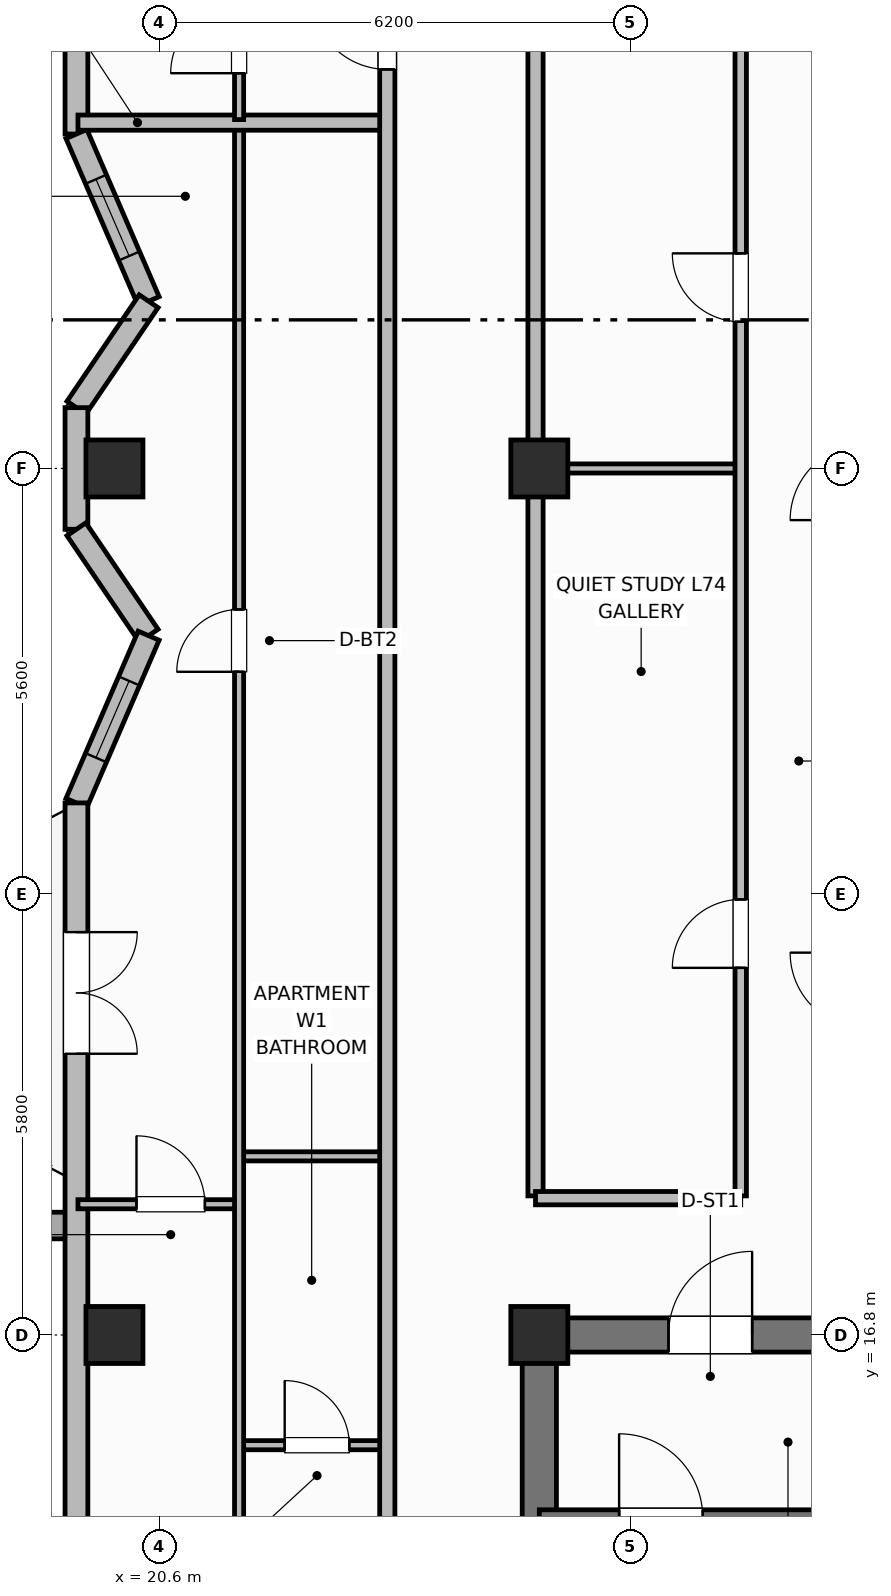
"""IFC4 building model, lengths in metres.
Left out: names, types, materials, properties, quantities, classifications, styles, units other than length and angle.
Written with IfcOpenShell. Run it as: python <this file> out.ifc"""

import sys

from ifc_helpers import new_model, si_unit, direction, frame, frame_2d, origin, origin_2d, place, context, subcontext, project, spatial, rectangle, extrude, element, fill, save


model = new_model("IFC4")
c1 = context("Model", 3, precision=1e-05, world=origin(), true_north=direction((0.0, 1.0)))
c2 = subcontext(c1, "Body", "Model", "MODEL_VIEW")
j1 = project(units=[si_unit("LENGTHUNIT", "METRE"), si_unit("PLANEANGLEUNIT", "RADIAN")], contexts=[c1])
p1 = place(None, origin())
s1 = spatial("IfcSite", under=j1, at=p1, CompositionType="ELEMENT")
p2 = place(p1, origin())
s2 = spatial("IfcBuilding", under=s1, at=p2, CompositionType="ELEMENT")
p3 = place(p2, frame((0.0, 0.0, 293.5)))
s3 = spatial("IfcBuildingStorey", under=s2, at=p3, CompositionType="ELEMENT", Elevation=293.5)
p4 = place(p3, frame((25.6, 10.825, 0.0), z_axis=(0.0, 0.0, 1.0), x_axis=(0.0, 1.0, 0.0)))
e1 = element("IfcWall", 1, at=p4, inside=s3, PredefinedType="SHEAR", context=c2, shape_type="SweptSolid", body=[
    extrude(rectangle(XDim=5.75, YDim=0.45, at=frame_2d((2.875, 0.0))), origin(), (0.0, 0.0, 1.0), 3.7),
])
p5 = place(p3, frame((25.6, 16.8, 0.0), z_axis=(0.0, 0.0, 1.0), x_axis=(1.0, 0.0, 0.0)))
e2 = element("IfcWall", 2, at=p5, inside=s3, PredefinedType="SHEAR", context=c2, shape_type="SweptSolid", body=[
    extrude(rectangle(XDim=27.2, YDim=0.45, at=frame_2d((13.6, 0.0))), origin(), (0.0, 0.0, 1.0), 3.7),
])
p6 = place(p5, frame((1.7, 0.0, 0.0)))
e3 = element("IfcOpeningElement", 3, at=p6, cuts=e2, PredefinedType="OPENING", context=c2, shape_type="SweptSolid", body=[
    extrude(rectangle(XDim=1.1, YDim=2.15, at=frame_2d((0.55, 1.075))), frame((0.0, 0.235, 0.0), z_axis=(0.0, -1.0, 0.0), x_axis=(1.0, 0.0, 0.0)), (0.0, 0.0, 1.0), 0.47),
])
p7 = place(p5, frame((4.45, 0.0, 0.0)))
e4 = element("IfcOpeningElement", 4, at=p7, cuts=e2, PredefinedType="OPENING", context=c2, shape_type="SweptSolid", body=[
    extrude(rectangle(XDim=0.85, YDim=2.1, at=frame_2d((0.425, 1.05))), frame((0.0, 0.235, 0.0), z_axis=(0.0, -1.0, 0.0), x_axis=(1.0, 0.0, 0.0)), (0.0, 0.0, 1.0), 0.47),
])
p8 = place(p5, frame((6.5, 0.0, 0.0)))
e5 = element("IfcOpeningElement", 5, at=p8, cuts=e2, PredefinedType="OPENING", context=c2, shape_type="SweptSolid", body=[
    extrude(rectangle(XDim=0.85, YDim=2.1, at=frame_2d((0.425, 1.05))), frame((0.0, 0.235, 0.0), z_axis=(0.0, -1.0, 0.0), x_axis=(1.0, 0.0, 0.0)), (0.0, 0.0, 1.0), 0.47),
])
p9 = place(p5, frame((13.0, 0.0, 0.0)))
e6 = element("IfcOpeningElement", 6, at=p9, cuts=e2, PredefinedType="OPENING", context=c2, shape_type="SweptSolid", body=[
    extrude(rectangle(XDim=1.2, YDim=2.15, at=frame_2d((0.6, 1.075))), frame((0.0, 0.235, 0.0), z_axis=(0.0, -1.0, 0.0), x_axis=(1.0, 0.0, 0.0)), (0.0, 0.0, 1.0), 0.47),
])
p10 = place(p5, frame((19.8, 0.0, 0.0)))
e7 = element("IfcOpeningElement", 7, at=p10, cuts=e2, PredefinedType="OPENING", context=c2, shape_type="SweptSolid", body=[
    extrude(rectangle(XDim=0.85, YDim=2.1, at=frame_2d((0.425, 1.05))), frame((0.0, 0.235, 0.0), z_axis=(0.0, -1.0, 0.0), x_axis=(1.0, 0.0, 0.0)), (0.0, 0.0, 1.0), 0.47),
])
p11 = place(p5, frame((24.2, 0.0, 0.0)))
e8 = element("IfcOpeningElement", 8, at=p11, cuts=e2, PredefinedType="OPENING", context=c2, shape_type="SweptSolid", body=[
    extrude(rectangle(XDim=0.85, YDim=2.1, at=frame_2d((0.425, 1.05))), frame((0.0, 0.235, 0.0), z_axis=(0.0, -1.0, 0.0), x_axis=(1.0, 0.0, 0.0)), (0.0, 0.0, 1.0), 0.47),
])
for number, where, z_axis, x_axis in (
    (9, (25.6, 16.8, 0.0), (0.0, 0.0, 1.0), (1.0, 0.0, 0.0)),
    (10, (25.6, 28.2, 0.0), (0.0, 0.0, 1.0), (1.0, 0.0, 0.0)),
    (11, (20.01, 16.8, 0.0), (0.0, 0.0, 1.0), (1.0, 0.0, 0.0)),
    (12, (20.01, 28.2, 0.0), (0.0, 0.0, 1.0), (1.0, 0.0, 0.0)),
):
    element("IfcColumn", number, at=place(p3, frame(where, z_axis=z_axis, x_axis=x_axis)), inside=s3, PredefinedType="COLUMN", context=c2, shape_type="SweptSolid", body=[
        extrude(rectangle(XDim=0.75, YDim=0.75, at=origin_2d()), origin(), (0.0, 0.0, 1.0), 3.7),
    ])
p12 = place(p3, frame((19.51, 35.27, 0.0), z_axis=(0.0, 0.0, 1.0), x_axis=(0.0, -1.0, 0.0)))
e13 = element("IfcWall", 13, at=p12, inside=s3, PredefinedType="SOLIDWALL", context=c2, shape_type="SweptSolid", body=[
    extrude(rectangle(XDim=2.67, YDim=0.3, at=frame_2d((1.335, 0.0))), origin(), (0.0, 0.0, 1.0), 2.71),
])
p13 = place(p3, frame((19.51, 32.6, 0.0), z_axis=(0.0, 0.0, 1.0), x_axis=(0.396389181543, -0.918082576218, 0.0)))
e14 = element("IfcWall", 14, at=p13, inside=s3, PredefinedType="SOLIDWALL", context=c2, shape_type="SweptSolid", body=[
    extrude(rectangle(XDim=2.396, YDim=0.3, at=frame_2d((1.198, 0.0))), origin(), (0.0, 0.0, 1.0), 2.71),
])
p14 = place(p13, frame((0.648, 0.0, 0.9)))
e15 = element("IfcOpeningElement", 15, at=p14, cuts=e14, PredefinedType="OPENING", context=c2, shape_type="SweptSolid", body=[
    extrude(rectangle(XDim=1.1, YDim=1.65, at=frame_2d((0.55, 0.825))), frame((0.0, 0.16, 0.0), z_axis=(0.0, -1.0, 0.0), x_axis=(1.0, 0.0, 0.0)), (0.0, 0.0, 1.0), 0.32),
])
p15 = place(p3, frame((20.46, 30.4, 0.0), z_axis=(0.0, 0.0, 1.0), x_axis=(-0.561508476251, -0.827470985049, 0.0)))
e16 = element("IfcWall", 16, at=p15, inside=s3, PredefinedType="SOLIDWALL", context=c2, shape_type="SweptSolid", body=[
    extrude(rectangle(XDim=1.692, YDim=0.3, at=frame_2d((0.846, 0.0))), origin(), (0.0, 0.0, 1.0), 2.71),
])
p16 = place(p3, frame((19.51, 29.0, 0.0), z_axis=(0.0, 0.0, 1.0), x_axis=(0.0, -1.0, 0.0)))
e17 = element("IfcWall", 17, at=p16, inside=s3, PredefinedType="SOLIDWALL", context=c2, shape_type="SweptSolid", body=[
    extrude(rectangle(XDim=1.6, YDim=0.3, at=frame_2d((0.8, 0.0))), origin(), (0.0, 0.0, 1.0), 2.71),
])
p17 = place(p3, frame((19.51, 27.4, 0.0), z_axis=(0.0, 0.0, 1.0), x_axis=(0.561508476251, -0.827470985049, 0.0)))
e18 = element("IfcWall", 18, at=p17, inside=s3, PredefinedType="SOLIDWALL", context=c2, shape_type="SweptSolid", body=[
    extrude(rectangle(XDim=1.692, YDim=0.3, at=frame_2d((0.846, 0.0))), origin(), (0.0, 0.0, 1.0), 2.71),
])
p18 = place(p3, frame((20.46, 26.0, 0.0), z_axis=(0.0, 0.0, 1.0), x_axis=(-0.396426258231, -0.918066567186, 0.0)))
e19 = element("IfcWall", 19, at=p18, inside=s3, PredefinedType="SOLIDWALL", context=c2, shape_type="SweptSolid", body=[
    extrude(rectangle(XDim=2.396, YDim=0.3, at=frame_2d((1.198, 0.0))), origin(), (0.0, 0.0, 1.0), 2.71),
])
p19 = place(p18, frame((0.648, 0.0, 0.9)))
e20 = element("IfcOpeningElement", 20, at=p19, cuts=e19, PredefinedType="OPENING", context=c2, shape_type="SweptSolid", body=[
    extrude(rectangle(XDim=1.1, YDim=1.65, at=frame_2d((0.55, 0.825))), frame((0.0, 0.16, 0.0), z_axis=(0.0, -1.0, 0.0), x_axis=(1.0, 0.0, 0.0)), (0.0, 0.0, 1.0), 0.32),
])
p20 = place(p3, frame((19.51, 23.8, 0.0), z_axis=(0.0, 0.0, 1.0), x_axis=(0.0, -1.0, 0.0)))
e21 = element("IfcWall", 21, at=p20, inside=s3, PredefinedType="SOLIDWALL", context=c2, shape_type="SweptSolid", body=[
    extrude(rectangle(XDim=11.12, YDim=0.3, at=frame_2d((5.56, 0.0))), origin(), (0.0, 0.0, 1.0), 2.71),
])
p21 = place(p20, frame((1.7, 0.0, 0.0)))
e22 = element("IfcOpeningElement", 22, at=p21, cuts=e21, PredefinedType="OPENING", context=c2, shape_type="SweptSolid", body=[
    extrude(rectangle(XDim=1.6, YDim=2.1, at=frame_2d((0.8, 1.05))), frame((0.0, 0.16, 0.0), z_axis=(0.0, -1.0, 0.0), x_axis=(1.0, 0.0, 0.0)), (0.0, 0.0, 1.0), 0.32),
])
p22 = place(p3, frame((25.6, 14.4, 0.0), z_axis=(0.0, 0.0, 1.0), x_axis=(1.0, 0.0, 0.0)))
e23 = element("IfcWall", 23, at=p22, inside=s3, PredefinedType="SHEAR", context=c2, shape_type="SweptSolid", body=[
    extrude(rectangle(XDim=9.55, YDim=0.2, at=frame_2d((4.775, 0.0))), origin(), (0.0, 0.0, 1.0), 3.7),
])
p23 = place(p22, frame((1.05, 0.0, 0.0)))
e24 = element("IfcOpeningElement", 24, at=p23, cuts=e23, PredefinedType="OPENING", context=c2, shape_type="SweptSolid", body=[
    extrude(rectangle(XDim=1.1, YDim=2.15, at=frame_2d((0.55, 1.075))), frame((0.0, 0.11, 0.0), z_axis=(0.0, -1.0, 0.0), x_axis=(1.0, 0.0, 0.0)), (0.0, 0.0, 1.0), 0.22),
])
p24 = place(p3, frame((25.55, 18.63, 0.0), z_axis=(0.0, 0.0, 1.0), x_axis=(0.0, 1.0, 0.0)))
e25 = element("IfcWall", 25, at=p24, inside=s3, PredefinedType="PARTITIONING", context=c2, shape_type="SweptSolid", body=[
    extrude(rectangle(XDim=19.14, YDim=0.2, at=frame_2d((9.57, 0.0))), origin(), (0.0, 0.0, 1.0), 2.54),
])
p25 = place(p3, frame((25.55, 18.6, 0.0), z_axis=(0.0, 0.0, 1.0), x_axis=(1.0, 0.0, 0.0)))
e26 = element("IfcWall", 26, at=p25, inside=s3, PredefinedType="PARTITIONING", context=c2, shape_type="SweptSolid", body=[
    extrude(rectangle(XDim=2.7, YDim=0.175, at=frame_2d((1.35, 0.0))), origin(), (0.0, 0.0, 1.0), 2.54),
])
p26 = place(p3, frame((25.6, 28.2, 0.0), z_axis=(0.0, 0.0, 1.0), x_axis=(1.0, 0.0, 0.0)))
e27 = element("IfcWall", 27, at=p26, inside=s3, PredefinedType="PARTITIONING", context=c2, shape_type="SweptSolid", body=[
    extrude(rectangle(XDim=2.66, YDim=0.12, at=frame_2d((1.33, 0.0))), origin(), (0.0, 0.0, 1.0), 2.54),
])
p27 = place(p3, frame((28.25, 18.63, 0.0), z_axis=(0.0, 0.0, 1.0), x_axis=(0.0, 1.0, 0.0)))
e28 = element("IfcWall", 28, at=p27, inside=s3, PredefinedType="PARTITIONING", context=c2, shape_type="SweptSolid", body=[
    extrude(rectangle(XDim=19.14, YDim=0.15, at=frame_2d((9.57, 0.0))), origin(), (0.0, 0.0, 1.0), 2.54),
])
p28 = place(p27, frame((3.0, 0.0, 0.0)))
e29 = element("IfcOpeningElement", 29, at=p28, cuts=e28, PredefinedType="OPENING", context=c2, shape_type="SweptSolid", body=[
    extrude(rectangle(XDim=0.9, YDim=2.1, at=frame_2d((0.45, 1.05))), frame((0.0, 0.085, 0.0), z_axis=(0.0, -1.0, 0.0), x_axis=(1.0, 0.0, 0.0)), (0.0, 0.0, 1.0), 0.17),
])
p29 = place(p27, frame((11.5, 0.0, 0.0)))
e30 = element("IfcOpeningElement", 30, at=p29, cuts=e28, PredefinedType="OPENING", context=c2, shape_type="SweptSolid", body=[
    extrude(rectangle(XDim=0.9, YDim=2.1, at=frame_2d((0.45, 1.05))), frame((0.0, 0.085, 0.0), z_axis=(0.0, -1.0, 0.0), x_axis=(1.0, 0.0, 0.0)), (0.0, 0.0, 1.0), 0.17),
])
p30 = place(p3, frame((21.65, 15.35, 0.0), z_axis=(0.0, 0.0, 1.0), x_axis=(1.0, 0.0, 0.0)))
e31 = element("IfcWall", 31, at=p30, inside=s3, PredefinedType="PARTITIONING", context=c2, shape_type="SweptSolid", body=[
    extrude(rectangle(XDim=1.95, YDim=0.12, at=frame_2d((0.975, 0.0))), origin(), (0.0, 0.0, 1.0), 2.54),
])
p31 = place(p30, frame((0.6, 0.0, 0.0)))
e32 = element("IfcOpeningElement", 32, at=p31, cuts=e31, PredefinedType="OPENING", context=c2, shape_type="SweptSolid", body=[
    extrude(rectangle(XDim=0.85, YDim=2.1, at=frame_2d((0.425, 1.05))), frame((0.0, 0.07, 0.0), z_axis=(0.0, -1.0, 0.0), x_axis=(1.0, 0.0, 0.0)), (0.0, 0.0, 1.0), 0.14),
])
p32 = place(p3, frame((21.65, 19.15, 0.0), z_axis=(0.0, 0.0, 1.0), x_axis=(1.0, 0.0, 0.0)))
e33 = element("IfcWall", 33, at=p32, inside=s3, PredefinedType="PARTITIONING", context=c2, shape_type="SweptSolid", body=[
    extrude(rectangle(XDim=1.95, YDim=0.12, at=frame_2d((0.975, 0.0))), origin(), (0.0, 0.0, 1.0), 2.54),
])
p33 = place(p3, frame((19.53, 18.52, 0.0), z_axis=(0.0, 0.0, 1.0), x_axis=(1.0, 0.0, 0.0)))
e34 = element("IfcWall", 34, at=p33, inside=s3, PredefinedType="PARTITIONING", context=c2, shape_type="SweptSolid", body=[
    extrude(rectangle(XDim=2.12, YDim=0.12, at=frame_2d((1.06, 0.0))), origin(), (0.0, 0.0, 1.0), 2.54),
])
p34 = place(p33, frame((0.77, 0.0, 0.0)))
e35 = element("IfcOpeningElement", 35, at=p34, cuts=e34, PredefinedType="OPENING", context=c2, shape_type="SweptSolid", body=[
    extrude(rectangle(XDim=0.9, YDim=2.1, at=frame_2d((0.45, 1.05))), frame((0.0, 0.07, 0.0), z_axis=(0.0, -1.0, 0.0), x_axis=(1.0, 0.0, 0.0)), (0.0, 0.0, 1.0), 0.14),
])
p35 = place(p3, frame((21.65, 9.99, 0.0), z_axis=(0.0, 0.0, 1.0), x_axis=(0.0, 1.0, 0.0)))
e36 = element("IfcWall", 36, at=p35, inside=s3, PredefinedType="PARTITIONING", context=c2, shape_type="SweptSolid", body=[
    extrude(rectangle(XDim=22.72, YDim=0.12, at=frame_2d((11.36, 0.0))), origin(), (0.0, 0.0, 1.0), 2.54),
])
p36 = place(p35, frame((0.41, 0.0, 0.0)))
e37 = element("IfcOpeningElement", 37, at=p36, cuts=e36, PredefinedType="OPENING", context=c2, shape_type="SweptSolid", body=[
    extrude(rectangle(XDim=0.9, YDim=2.1, at=frame_2d((0.45, 1.05))), frame((0.0, 0.07, 0.0), z_axis=(0.0, -1.0, 0.0), x_axis=(1.0, 0.0, 0.0)), (0.0, 0.0, 1.0), 0.14),
])
p37 = place(p35, frame((15.535, 0.0, 0.0)))
e38 = element("IfcOpeningElement", 38, at=p37, cuts=e36, PredefinedType="OPENING", context=c2, shape_type="SweptSolid", body=[
    extrude(rectangle(XDim=0.82, YDim=2.08, at=frame_2d((0.41, 1.04))), frame((0.0, 0.07, 0.0), z_axis=(0.0, -1.0, 0.0), x_axis=(1.0, 0.0, 0.0)), (0.0, 0.0, 1.0), 0.14),
])
p38 = place(p3, frame((19.53, 32.75, 0.0), z_axis=(0.0, 0.0, 1.0), x_axis=(1.0, 0.0, 0.0)))
e39 = element("IfcWall", 39, at=p38, inside=s3, PredefinedType="PARTITIONING", context=c2, shape_type="SweptSolid", body=[
    extrude(rectangle(XDim=4.07, YDim=0.2, at=frame_2d((2.035, 0.0))), origin(), (0.0, 0.0, 1.0), 2.54),
])
p39 = place(p3, frame((21.65, 32.79, 0.0), z_axis=(0.0, 0.0, 1.0), x_axis=(0.0, 1.0, 0.0)))
e40 = element("IfcWall", 40, at=p39, inside=s3, PredefinedType="PARTITIONING", context=c2, shape_type="SweptSolid", body=[
    extrude(rectangle(XDim=13.62, YDim=0.12, at=frame_2d((6.81, 0.0))), origin(), (0.0, 0.0, 1.0), 2.54),
])
p40 = place(p39, frame((0.61, 0.0, 0.0)))
e41 = element("IfcOpeningElement", 41, at=p40, cuts=e40, PredefinedType="OPENING", context=c2, shape_type="SweptSolid", body=[
    extrude(rectangle(XDim=0.9, YDim=2.1, at=frame_2d((0.45, 1.05))), frame((0.0, 0.07, 0.0), z_axis=(0.0, -1.0, 0.0), x_axis=(1.0, 0.0, 0.0)), (0.0, 0.0, 1.0), 0.14),
])
p41 = place(p39, frame((10.985, 0.0, 0.0)))
e42 = element("IfcOpeningElement", 42, at=p41, cuts=e40, PredefinedType="OPENING", context=c2, shape_type="SweptSolid", body=[
    extrude(rectangle(XDim=0.82, YDim=2.08, at=frame_2d((0.41, 1.04))), frame((0.0, 0.07, 0.0), z_axis=(0.0, -1.0, 0.0), x_axis=(1.0, 0.0, 0.0)), (0.0, 0.0, 1.0), 0.14),
])
p42 = place(p3, frame((23.6, 9.95, 0.0), z_axis=(0.0, 0.0, 1.0), x_axis=(0.0, 1.0, 0.0)))
e43 = element("IfcWall", 43, at=p42, inside=s3, PredefinedType="PARTITIONING", context=c2, shape_type="SweptSolid", body=[
    extrude(rectangle(XDim=36.5, YDim=0.2, at=frame_2d((18.25, 0.0))), origin(), (0.0, 0.0, 1.0), 2.54),
])
p43 = place(p42, frame((3.25, 0.0, 0.0)))
e44 = element("IfcOpeningElement", 44, at=p43, cuts=e43, PredefinedType="OPENING", context=c2, shape_type="SweptSolid", body=[
    extrude(rectangle(XDim=1.0, YDim=2.15, at=frame_2d((0.5, 1.075))), frame((0.0, 0.11, 0.0), z_axis=(0.0, -1.0, 0.0), x_axis=(1.0, 0.0, 0.0)), (0.0, 0.0, 1.0), 0.22),
])
p44 = place(p42, frame((23.5, 0.0, 0.0)))
e45 = element("IfcOpeningElement", 45, at=p44, cuts=e43, PredefinedType="OPENING", context=c2, shape_type="SweptSolid", body=[
    extrude(rectangle(XDim=1.0, YDim=2.15, at=frame_2d((0.5, 1.075))), frame((0.0, 0.11, 0.0), z_axis=(0.0, -1.0, 0.0), x_axis=(1.0, 0.0, 0.0)), (0.0, 0.0, 1.0), 0.22),
])
p45 = place(p14, origin())
e46 = element("IfcWindow", 46, at=p45, inside=s3, PartitioningType="SINGLE_PANEL", PredefinedType="WINDOW", context=c2, shape_type="SweptSolid", body=[
    extrude(rectangle(XDim=1.1, YDim=1.65, at=frame_2d((0.55, 0.825))), frame((0.0, 0.03, 0.0), z_axis=(0.0, -1.0, 0.0), x_axis=(1.0, 0.0, 0.0)), (0.0, 0.0, 1.0), 0.06),
])
fill(e15, e46)
p46 = place(p19, origin())
e47 = element("IfcWindow", 47, at=p46, inside=s3, PartitioningType="SINGLE_PANEL", PredefinedType="WINDOW", context=c2, shape_type="SweptSolid", body=[
    extrude(rectangle(XDim=1.1, YDim=1.65, at=frame_2d((0.55, 0.825))), frame((0.0, 0.03, 0.0), z_axis=(0.0, -1.0, 0.0), x_axis=(1.0, 0.0, 0.0)), (0.0, 0.0, 1.0), 0.06),
])
fill(e20, e47)
p47 = place(p21, origin())
e48 = element("IfcDoor", 48, at=p47, inside=s3, OperationType="DOUBLE_DOOR_SINGLE_SWING", PredefinedType="DOOR", context=c2, shape_type="SweptSolid", body=[
    extrude(rectangle(XDim=1.6, YDim=2.1, at=frame_2d((0.8, 1.05))), frame((0.0, 0.025, 0.0), z_axis=(0.0, -1.0, 0.0), x_axis=(1.0, 0.0, 0.0)), (0.0, 0.0, 1.0), 0.05),
])
fill(e22, e48)
p48 = place(p23, origin())
e49 = element("IfcDoor", 49, at=p48, inside=s3, OperationType="SINGLE_SWING_LEFT", PredefinedType="DOOR", context=c2, shape_type="SweptSolid", body=[
    extrude(rectangle(XDim=1.1, YDim=2.15, at=frame_2d((0.55, 1.075))), frame((0.0, 0.025, 0.0), z_axis=(0.0, -1.0, 0.0), x_axis=(1.0, 0.0, 0.0)), (0.0, 0.0, 1.0), 0.05),
])
fill(e24, e49)
p49 = place(p28, origin())
e50 = element("IfcDoor", 50, at=p49, inside=s3, OperationType="SINGLE_SWING_LEFT", PredefinedType="DOOR", context=c2, shape_type="SweptSolid", body=[
    extrude(rectangle(XDim=0.9, YDim=2.1, at=frame_2d((0.45, 1.05))), frame((0.0, 0.025, 0.0), z_axis=(0.0, -1.0, 0.0), x_axis=(1.0, 0.0, 0.0)), (0.0, 0.0, 1.0), 0.05),
])
fill(e29, e50)
p50 = place(p29, origin())
e51 = element("IfcDoor", 51, at=p50, inside=s3, OperationType="SINGLE_SWING_RIGHT", PredefinedType="DOOR", context=c2, shape_type="SweptSolid", body=[
    extrude(rectangle(XDim=0.9, YDim=2.1, at=frame_2d((0.45, 1.05))), frame((0.0, 0.025, 0.0), z_axis=(0.0, -1.0, 0.0), x_axis=(1.0, 0.0, 0.0)), (0.0, 0.0, 1.0), 0.05),
])
fill(e30, e51)
p51 = place(p31, origin())
e52 = element("IfcDoor", 52, at=p51, inside=s3, OperationType="SINGLE_SWING_LEFT", PredefinedType="DOOR", context=c2, shape_type="SweptSolid", body=[
    extrude(rectangle(XDim=0.85, YDim=2.1, at=frame_2d((0.425, 1.05))), frame((0.0, 0.025, 0.0), z_axis=(0.0, -1.0, 0.0), x_axis=(1.0, 0.0, 0.0)), (0.0, 0.0, 1.0), 0.05),
])
fill(e32, e52)
p52 = place(p34, origin())
e53 = element("IfcDoor", 53, at=p52, inside=s3, OperationType="SINGLE_SWING_LEFT", PredefinedType="DOOR", context=c2, shape_type="SweptSolid", body=[
    extrude(rectangle(XDim=0.9, YDim=2.1, at=frame_2d((0.45, 1.05))), frame((0.0, 0.025, 0.0), z_axis=(0.0, -1.0, 0.0), x_axis=(1.0, 0.0, 0.0)), (0.0, 0.0, 1.0), 0.05),
])
fill(e35, e53)
p53 = place(p37, origin())
e54 = element("IfcDoor", 54, at=p53, inside=s3, OperationType="SINGLE_SWING_LEFT", PredefinedType="DOOR", context=c2, shape_type="SweptSolid", body=[
    extrude(rectangle(XDim=0.82, YDim=2.08, at=frame_2d((0.41, 1.04))), frame((0.0, 0.025, 0.0), z_axis=(0.0, -1.0, 0.0), x_axis=(1.0, 0.0, 0.0)), (0.0, 0.0, 1.0), 0.05),
])
fill(e38, e54)
p54 = place(p40, origin())
e55 = element("IfcDoor", 55, at=p54, inside=s3, OperationType="SINGLE_SWING_LEFT", PredefinedType="DOOR", context=c2, shape_type="SweptSolid", body=[
    extrude(rectangle(XDim=0.9, YDim=2.1, at=frame_2d((0.45, 1.05))), frame((0.0, 0.025, 0.0), z_axis=(0.0, -1.0, 0.0), x_axis=(1.0, 0.0, 0.0)), (0.0, 0.0, 1.0), 0.05),
])
fill(e41, e55)
p55 = place(p44, origin())
e56 = element("IfcDoor", 56, at=p55, inside=s3, OperationType="SINGLE_SWING_RIGHT", PredefinedType="DOOR", context=c2, shape_type="SweptSolid", body=[
    extrude(rectangle(XDim=1.0, YDim=2.15, at=frame_2d((0.5, 1.075))), frame((0.0, 0.025, 0.0), z_axis=(0.0, -1.0, 0.0), x_axis=(1.0, 0.0, 0.0)), (0.0, 0.0, 1.0), 0.05),
])
fill(e45, e56)
p56 = place(p6, origin())
e57 = element("IfcDoor", 57, at=p56, inside=s3, OperationType="SINGLE_SWING_RIGHT", PredefinedType="DOOR", context=c2, shape_type="SweptSolid", body=[
    extrude(rectangle(XDim=1.1, YDim=2.15, at=frame_2d((0.55, 1.075))), frame((0.0, 0.025, 0.0), z_axis=(0.0, -1.0, 0.0), x_axis=(1.0, 0.0, 0.0)), (0.0, 0.0, 1.0), 0.05),
])
fill(e3, e57)
save(model, sys.argv[1])
